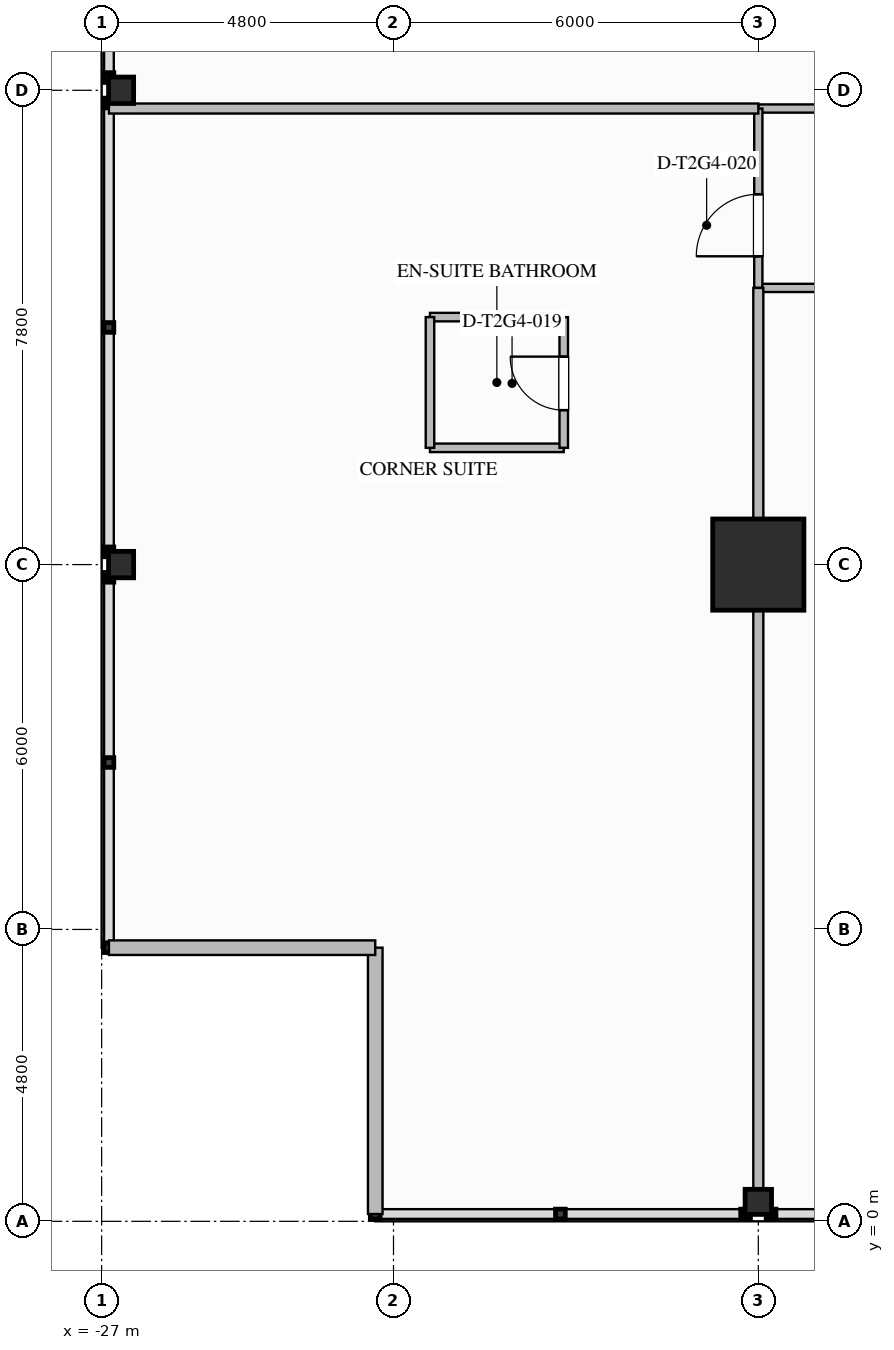
"""IFC4 building model, lengths in metres.
Left out: names, types, materials, properties, quantities, classifications, styles, units other than length and angle.
Written with IfcOpenShell. Run it as: python <this file> out.ifc"""

import sys

from ifc_helpers import new_model, si_unit, direction, frame, frame_2d, origin, origin_2d, place, context, subcontext, project, spatial, rectangle, i_section, extrude, element, fill, save


model = new_model("IFC4")
c1 = context("Model", 3, precision=1e-05, world=origin(), true_north=direction((0.0, 1.0)))
c2 = subcontext(c1, "Body", "Model", "MODEL_VIEW")
j1 = project(units=[si_unit("LENGTHUNIT", "METRE"), si_unit("PLANEANGLEUNIT", "RADIAN")], contexts=[c1])
p1 = place(None, origin())
s1 = spatial("IfcSite", under=j1, at=p1, CompositionType="ELEMENT")
p2 = place(p1, origin())
s2 = spatial("IfcBuilding", under=s1, at=p2, CompositionType="ELEMENT")
p3 = place(p2, frame((0.0, 0.0, 123.3)))
s3 = spatial("IfcBuildingStorey", under=s2, at=p3, CompositionType="ELEMENT", Elevation=123.3)
p4 = place(p3, frame((-16.2, 10.8, 0.0), z_axis=(0.0, 0.0, 1.0), x_axis=(1.0, 0.0, 0.0)))
e1 = element("IfcColumn", 1, at=p4, inside=s3, PredefinedType="COLUMN", context=c2, shape_type="SweptSolid", body=[
    extrude(rectangle(XDim=1.5, YDim=1.5, at=origin_2d()), origin(), (0.0, 0.0, 1.0), 3.5),
])
for number, where, z_axis, x_axis in (
    (2, (-26.68, 10.8, 0.0), (0.0, 0.0, 1.0), (1.0, 0.0, 0.0)),
    (3, (-26.68, 18.6, 0.0), (0.0, 0.0, 1.0), (1.0, 0.0, 0.0)),
    (4, (-16.2, 0.32, 0.0), (0.0, 0.0, 1.0), (0.0, 1.0, 0.0)),
):
    element("IfcColumn", number, at=place(p3, frame(where, z_axis=z_axis, x_axis=x_axis)), inside=s3, PredefinedType="COLUMN", context=c2, shape_type="SweptSolid", body=[
        extrude(i_section(OverallWidth=0.412, OverallDepth=0.435, WebThickness=0.036, FlangeThickness=0.057, FilletRadius=0.028, at=origin_2d()), origin(), (0.0, 0.0, 1.0), 3.497),
    ])
for number, where, z_axis, x_axis in (
    (5, (-22.5, 0.12, 0.0), (0.0, 0.0, 1.0), (0.0, 1.0, 0.0)),
    (6, (-22.5, 4.5, 0.0), (0.0, 0.0, 1.0), (-1.0, 0.0, 0.0)),
):
    element("IfcWall", number, at=place(p3, frame(where, z_axis=z_axis, x_axis=x_axis)), inside=s3, PredefinedType="STANDARD", context=c2, shape_type="SweptSolid", body=[
        extrude(rectangle(XDim=4.38, YDim=0.24, at=frame_2d((2.19, 0.0))), origin(), (0.0, 0.0, 1.0), 3.24),
    ])
p5 = place(p3, frame((-16.2, 18.3, 0.0), z_axis=(0.0, 0.0, 1.0), x_axis=(1.0, 0.0, 0.0)))
e7 = element("IfcWall", 7, at=p5, inside=s3, PredefinedType="PARTITIONING", context=c2, shape_type="SweptSolid", body=[
    extrude(rectangle(XDim=5.4, YDim=0.135, at=frame_2d((2.7, 0.0))), origin(), (0.0, 0.0, 1.0), 3.24),
])
p6 = place(p3, frame((-16.2, 15.35, 0.0), z_axis=(0.0, 0.0, 1.0), x_axis=(1.0, 0.0, 0.0)))
e8 = element("IfcWall", 8, at=p6, inside=s3, PredefinedType="PARTITIONING", context=c2, shape_type="SweptSolid", body=[
    extrude(rectangle(XDim=24.9, YDim=0.135, at=frame_2d((12.45, 0.0))), origin(), (0.0, 0.0, 1.0), 3.24),
])
p7 = place(p6, frame((1.89, 0.0, 0.0)))
e9 = element("IfcOpeningElement", 9, at=p7, cuts=e8, PredefinedType="OPENING", context=c2, shape_type="SweptSolid", body=[
    extrude(rectangle(XDim=1.26, YDim=2.2, at=frame_2d((0.63, 1.1))), frame((0.0, 0.077, 0.0), z_axis=(0.0, -1.0, 0.0), x_axis=(1.0, 0.0, 0.0)), (0.0, 0.0, 1.0), 0.155),
])
p8 = place(p6, frame((10.916, 0.0, 0.0)))
e10 = element("IfcOpeningElement", 10, at=p8, cuts=e8, PredefinedType="OPENING", context=c2, shape_type="SweptSolid", body=[
    extrude(rectangle(XDim=1.26, YDim=2.2, at=frame_2d((0.63, 1.1))), frame((0.0, 0.077, 0.0), z_axis=(0.0, -1.0, 0.0), x_axis=(1.0, 0.0, 0.0)), (0.0, 0.0, 1.0), 0.155),
])
p9 = place(p6, frame((19.631, 0.0, 0.0)))
e11 = element("IfcOpeningElement", 11, at=p9, cuts=e8, PredefinedType="OPENING", context=c2, shape_type="SweptSolid", body=[
    extrude(rectangle(XDim=1.26, YDim=2.2, at=frame_2d((0.63, 1.1))), frame((0.0, 0.077, 0.0), z_axis=(0.0, -1.0, 0.0), x_axis=(1.0, 0.0, 0.0)), (0.0, 0.0, 1.0), 0.155),
])
p10 = place(p3, frame((-16.2, 15.35, 0.0), z_axis=(0.0, 0.0, 1.0), x_axis=(0.0, 1.0, 0.0)))
e12 = element("IfcWall", 12, at=p10, inside=s3, PredefinedType="PARTITIONING", context=c2, shape_type="SweptSolid", body=[
    extrude(rectangle(XDim=2.95, YDim=0.135, at=frame_2d((1.475, 0.0))), origin(), (0.0, 0.0, 1.0), 2.53),
])
p11 = place(p10, frame((0.52, 0.0, 0.0)))
e13 = element("IfcOpeningElement", 13, at=p11, cuts=e12, PredefinedType="OPENING", context=c2, shape_type="SweptSolid", body=[
    extrude(rectangle(XDim=1.02, YDim=2.15, at=frame_2d((0.51, 1.075))), frame((0.0, 0.077, 0.0), z_axis=(0.0, -1.0, 0.0), x_axis=(1.0, 0.0, 0.0)), (0.0, 0.0, 1.0), 0.155),
])
p12 = place(p3, frame((-16.2, 0.12, 0.0), z_axis=(0.0, 0.0, 1.0), x_axis=(0.0, 1.0, 0.0)))
e14 = element("IfcWall", 14, at=p12, inside=s3, PredefinedType="PARTITIONING", context=c2, shape_type="SweptSolid", body=[
    extrude(rectangle(XDim=15.23, YDim=0.165, at=frame_2d((7.615, 0.0))), origin(), (0.0, 0.0, 1.0), 2.53),
])
p13 = place(p3, frame((-26.88, 18.3, 0.0), z_axis=(0.0, 0.0, 1.0), x_axis=(1.0, 0.0, 0.0)))
e15 = element("IfcWall", 15, at=p13, inside=s3, PredefinedType="PARTITIONING", context=c2, shape_type="SweptSolid", body=[
    extrude(rectangle(XDim=10.68, YDim=0.165, at=frame_2d((5.34, 0.0))), origin(), (0.0, 0.0, 1.0), 2.53),
])
for number, where, z_axis, x_axis in (
    (16, (-21.6, 12.72, 0.0), (0.0, 0.0, 1.0), (1.0, 0.0, 0.0)),
    (17, (-21.6, 14.87, 0.0), (0.0, 0.0, 1.0), (1.0, 0.0, 0.0)),
):
    element("IfcWall", number, at=place(p3, frame(where, z_axis=z_axis, x_axis=x_axis)), inside=s3, PredefinedType="PLUMBINGWALL", context=c2, shape_type="SweptSolid", body=[
        extrude(rectangle(XDim=2.2, YDim=0.14, at=frame_2d((1.1, 0.0))), origin(), (0.0, 0.0, 1.0), 3.24),
    ])
p14 = place(p3, frame((-21.6, 12.72, 0.0), z_axis=(0.0, 0.0, 1.0), x_axis=(0.0, 1.0, 0.0)))
e18 = element("IfcWall", 18, at=p14, inside=s3, PredefinedType="PLUMBINGWALL", context=c2, shape_type="SweptSolid", body=[
    extrude(rectangle(XDim=2.15, YDim=0.14, at=frame_2d((1.075, 0.0))), origin(), (0.0, 0.0, 1.0), 3.24),
])
p15 = place(p3, frame((-19.4, 12.72, 0.0), z_axis=(0.0, 0.0, 1.0), x_axis=(0.0, 1.0, 0.0)))
e19 = element("IfcWall", 19, at=p15, inside=s3, PredefinedType="PLUMBINGWALL", context=c2, shape_type="SweptSolid", body=[
    extrude(rectangle(XDim=2.15, YDim=0.14, at=frame_2d((1.075, 0.0))), origin(), (0.0, 0.0, 1.0), 3.24),
])
p16 = place(p15, frame((0.62, 0.0, 0.0)))
e20 = element("IfcOpeningElement", 20, at=p16, cuts=e19, PredefinedType="OPENING", context=c2, shape_type="SweptSolid", body=[
    extrude(rectangle(XDim=0.88, YDim=2.1, at=frame_2d((0.44, 1.05))), frame((0.0, 0.08, 0.0), z_axis=(0.0, -1.0, 0.0), x_axis=(1.0, 0.0, 0.0)), (0.0, 0.0, 1.0), 0.16),
])
p17 = place(p16, origin())
e21 = element("IfcDoor", 21, at=p17, inside=s3, OperationType="SINGLE_SWING_RIGHT", PredefinedType="DOOR", context=c2, shape_type="SweptSolid", body=[
    extrude(rectangle(XDim=0.88, YDim=2.1, at=frame_2d((0.44, 1.05))), frame((0.0, 0.025, 0.0), z_axis=(0.0, -1.0, 0.0), x_axis=(1.0, 0.0, 0.0)), (0.0, 0.0, 1.0), 0.05),
])
fill(e20, e21)
p18 = place(p11, origin())
e22 = element("IfcDoor", 22, at=p18, inside=s3, OperationType="SINGLE_SWING_LEFT", PredefinedType="DOOR", context=c2, shape_type="SweptSolid", body=[
    extrude(rectangle(XDim=1.02, YDim=2.15, at=frame_2d((0.51, 1.075))), frame((0.0, 0.025, 0.0), z_axis=(0.0, -1.0, 0.0), x_axis=(1.0, 0.0, 0.0)), (0.0, 0.0, 1.0), 0.05),
])
fill(e13, e22)
save(model, sys.argv[1])
